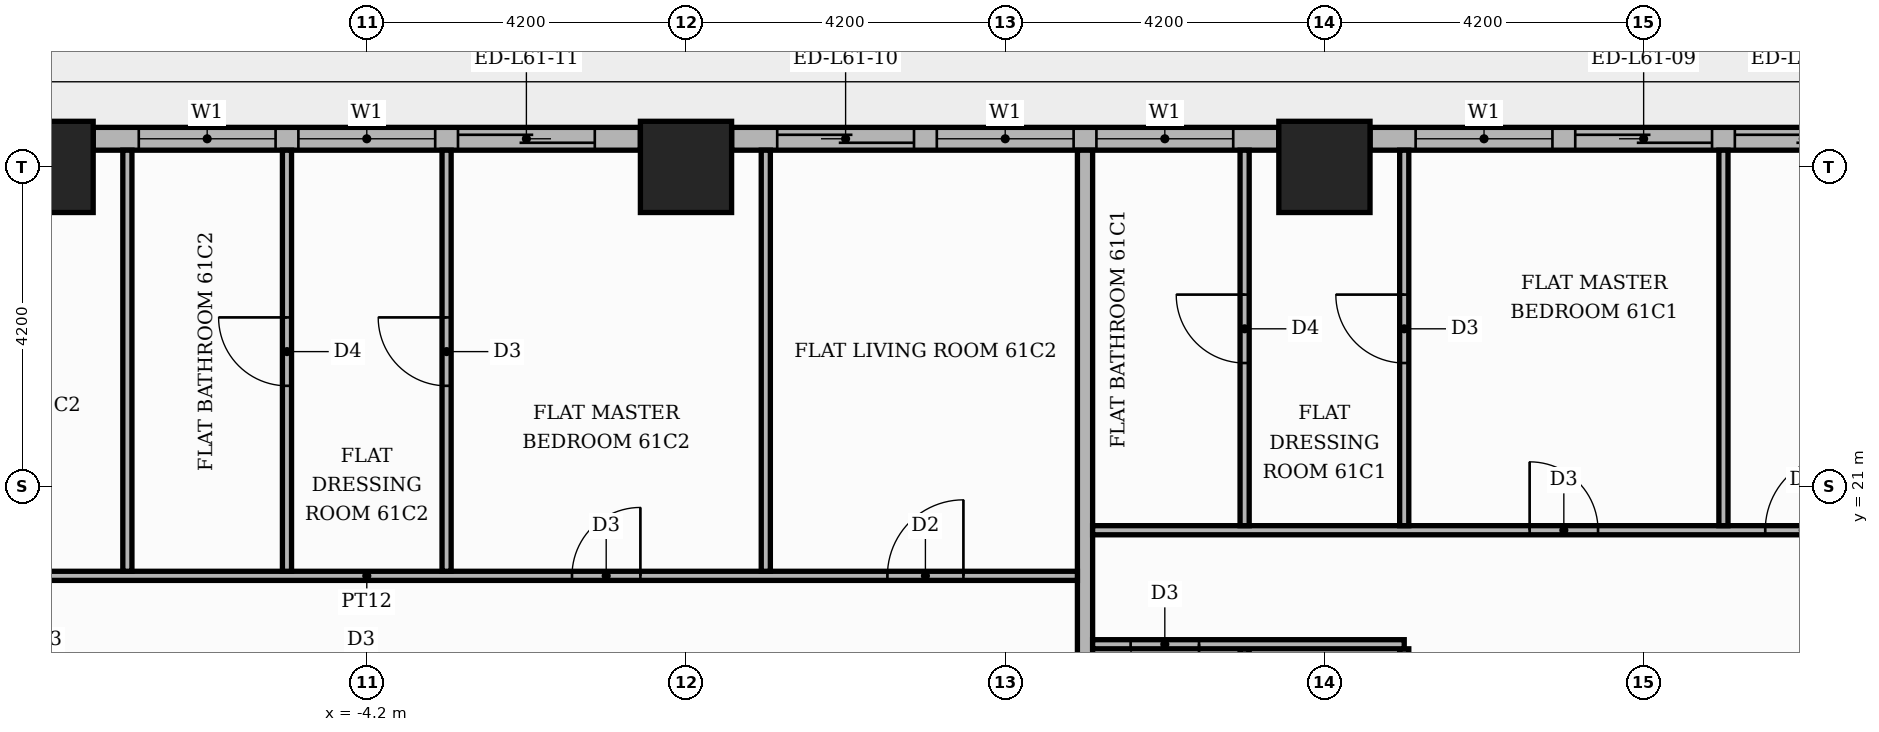
"""IFC4 building model, lengths in metres.
Left out: names, types, materials, properties, quantities, classifications, styles, units other than length and angle.
Written with IfcOpenShell. Run it as: python <this file> out.ifc"""

import sys

from ifc_helpers import new_model, si_unit, direction, frame, frame_2d, origin, origin_2d, place, context, subcontext, project, spatial, rectangle, extrude, element, fill, save


model = new_model("IFC4")
c1 = context("Model", 3, precision=1e-05, world=origin(), true_north=direction((0.0, 1.0)))
c2 = subcontext(c1, "Body", "Model", "MODEL_VIEW")
j1 = project(units=[si_unit("LENGTHUNIT", "METRE"), si_unit("PLANEANGLEUNIT", "RADIAN")], contexts=[c1])
p1 = place(None, origin())
s1 = spatial("IfcSite", under=j1, at=p1, CompositionType="ELEMENT")
p2 = place(p1, origin())
s2 = spatial("IfcBuilding", under=s1, at=p2, CompositionType="ELEMENT")
p3 = place(p2, frame((0.0, 0.0, 256.2)))
s3 = spatial("IfcBuildingStorey", under=s2, at=p3, CompositionType="ELEMENT", Elevation=256.2)
for number, where, z_axis, x_axis in (
    (1, (0.0, 25.2, 0.0), (0.0, 0.0, 1.0), (1.0, 0.0, 0.0)),
    (2, (-8.4, 25.2, 0.0), (0.0, 0.0, 1.0), (1.0, 0.0, 0.0)),
    (3, (8.4, 25.2, 0.0), (0.0, 0.0, 1.0), (1.0, 0.0, 0.0)),
):
    element("IfcColumn", number, at=place(p3, frame(where, z_axis=z_axis, x_axis=x_axis)), inside=s3, PredefinedType="COLUMN", context=c2, shape_type="SweptSolid", body=[
        extrude(rectangle(XDim=1.2, YDim=1.2, at=origin_2d()), origin(), (0.0, 0.0, 1.0), 3.9),
    ])
p4 = place(p3, frame((16.2, 25.57, 0.0), z_axis=(0.0, 0.0, 1.0), x_axis=(-1.0, 0.0, 0.0)))
e4 = element("IfcWall", 4, at=p4, inside=s3, PredefinedType="STANDARD", context=c2, shape_type="SweptSolid", body=[
    extrude(rectangle(XDim=7.2, YDim=0.3, at=frame_2d((3.6, 0.0))), origin(), (0.0, 0.0, 1.0), 3.48),
])
p5 = place(p4, frame((0.6, 0.0, 0.0)))
e5 = element("IfcOpeningElement", 5, at=p5, cuts=e4, PredefinedType="OPENING", context=c2, shape_type="SweptSolid", body=[
    extrude(rectangle(XDim=1.8, YDim=2.4, at=frame_2d((0.9, 1.2))), frame((0.0, 0.16, 0.0), z_axis=(0.0, -1.0, 0.0), x_axis=(1.0, 0.0, 0.0)), (0.0, 0.0, 1.0), 0.32),
])
p6 = place(p4, frame((2.7, 0.0, 0.0)))
e6 = element("IfcOpeningElement", 6, at=p6, cuts=e4, PredefinedType="OPENING", context=c2, shape_type="SweptSolid", body=[
    extrude(rectangle(XDim=1.8, YDim=2.4, at=frame_2d((0.9, 1.2))), frame((0.0, 0.16, 0.0), z_axis=(0.0, -1.0, 0.0), x_axis=(1.0, 0.0, 0.0)), (0.0, 0.0, 1.0), 0.32),
])
p7 = place(p4, frame((4.8, 0.0, 0.9)))
e7 = element("IfcOpeningElement", 7, at=p7, cuts=e4, PredefinedType="OPENING", context=c2, shape_type="SweptSolid", body=[
    extrude(rectangle(XDim=1.8, YDim=2.1, at=frame_2d((0.9, 1.05))), frame((0.0, 0.16, 0.0), z_axis=(0.0, -1.0, 0.0), x_axis=(1.0, 0.0, 0.0)), (0.0, 0.0, 1.0), 0.32),
])
p8 = place(p3, frame((7.8, 25.57, 0.0), z_axis=(0.0, 0.0, 1.0), x_axis=(-1.0, 0.0, 0.0)))
e8 = element("IfcWall", 8, at=p8, inside=s3, PredefinedType="STANDARD", context=c2, shape_type="SweptSolid", body=[
    extrude(rectangle(XDim=7.2, YDim=0.3, at=frame_2d((3.6, 0.0))), origin(), (0.0, 0.0, 1.0), 3.48),
])
p9 = place(p8, frame((0.6, 0.0, 0.9)))
e9 = element("IfcOpeningElement", 9, at=p9, cuts=e8, PredefinedType="OPENING", context=c2, shape_type="SweptSolid", body=[
    extrude(rectangle(XDim=1.8, YDim=2.1, at=frame_2d((0.9, 1.05))), frame((0.0, 0.16, 0.0), z_axis=(0.0, -1.0, 0.0), x_axis=(1.0, 0.0, 0.0)), (0.0, 0.0, 1.0), 0.32),
])
p10 = place(p8, frame((2.7, 0.0, 0.9)))
e10 = element("IfcOpeningElement", 10, at=p10, cuts=e8, PredefinedType="OPENING", context=c2, shape_type="SweptSolid", body=[
    extrude(rectangle(XDim=1.8, YDim=2.1, at=frame_2d((0.9, 1.05))), frame((0.0, 0.16, 0.0), z_axis=(0.0, -1.0, 0.0), x_axis=(1.0, 0.0, 0.0)), (0.0, 0.0, 1.0), 0.32),
])
p11 = place(p8, frame((4.8, 0.0, 0.0)))
e11 = element("IfcOpeningElement", 11, at=p11, cuts=e8, PredefinedType="OPENING", context=c2, shape_type="SweptSolid", body=[
    extrude(rectangle(XDim=1.8, YDim=2.4, at=frame_2d((0.9, 1.2))), frame((0.0, 0.16, 0.0), z_axis=(0.0, -1.0, 0.0), x_axis=(1.0, 0.0, 0.0)), (0.0, 0.0, 1.0), 0.32),
])
p12 = place(p3, frame((-0.6, 25.57, 0.0), z_axis=(0.0, 0.0, 1.0), x_axis=(-1.0, 0.0, 0.0)))
e12 = element("IfcWall", 12, at=p12, inside=s3, PredefinedType="STANDARD", context=c2, shape_type="SweptSolid", body=[
    extrude(rectangle(XDim=7.2, YDim=0.3, at=frame_2d((3.6, 0.0))), origin(), (0.0, 0.0, 1.0), 3.48),
])
p13 = place(p12, frame((0.6, 0.0, 0.0)))
e13 = element("IfcOpeningElement", 13, at=p13, cuts=e12, PredefinedType="OPENING", context=c2, shape_type="SweptSolid", body=[
    extrude(rectangle(XDim=1.8, YDim=2.4, at=frame_2d((0.9, 1.2))), frame((0.0, 0.16, 0.0), z_axis=(0.0, -1.0, 0.0), x_axis=(1.0, 0.0, 0.0)), (0.0, 0.0, 1.0), 0.32),
])
p14 = place(p12, frame((2.7, 0.0, 0.9)))
e14 = element("IfcOpeningElement", 14, at=p14, cuts=e12, PredefinedType="OPENING", context=c2, shape_type="SweptSolid", body=[
    extrude(rectangle(XDim=1.8, YDim=2.1, at=frame_2d((0.9, 1.05))), frame((0.0, 0.16, 0.0), z_axis=(0.0, -1.0, 0.0), x_axis=(1.0, 0.0, 0.0)), (0.0, 0.0, 1.0), 0.32),
])
p15 = place(p12, frame((4.8, 0.0, 0.9)))
e15 = element("IfcOpeningElement", 15, at=p15, cuts=e12, PredefinedType="OPENING", context=c2, shape_type="SweptSolid", body=[
    extrude(rectangle(XDim=1.8, YDim=2.1, at=frame_2d((0.9, 1.05))), frame((0.0, 0.16, 0.0), z_axis=(0.0, -1.0, 0.0), x_axis=(1.0, 0.0, 0.0)), (0.0, 0.0, 1.0), 0.32),
])
p16 = place(p3, frame((5.25, 13.75, 0.0), z_axis=(0.0, 0.0, 1.0), x_axis=(0.0, 1.0, 0.0)))
e16 = element("IfcWall", 16, at=p16, inside=s3, PredefinedType="PARTITIONING", context=c2, shape_type="SweptSolid", body=[
    extrude(rectangle(XDim=11.67, YDim=0.2, at=frame_2d((5.835, 0.0))), origin(), (0.0, 0.0, 1.0), 3.48),
])
p17 = place(p3, frame((7.35, 13.75, 0.0), z_axis=(0.0, 0.0, 1.0), x_axis=(0.0, 1.0, 0.0)))
e17 = element("IfcWall", 17, at=p17, inside=s3, PredefinedType="PARTITIONING", context=c2, shape_type="SweptSolid", body=[
    extrude(rectangle(XDim=5.11, YDim=0.12, at=frame_2d((2.555, 0.0))), origin(), (0.0, 0.0, 1.0), 3.48),
])
p18 = place(p3, frame((9.45, 13.75, 0.0), z_axis=(0.0, 0.0, 1.0), x_axis=(0.0, 1.0, 0.0)))
e18 = element("IfcWall", 18, at=p18, inside=s3, PredefinedType="PARTITIONING", context=c2, shape_type="SweptSolid", body=[
    extrude(rectangle(XDim=5.11, YDim=0.12, at=frame_2d((2.555, 0.0))), origin(), (0.0, 0.0, 1.0), 3.48),
])
p19 = place(p18, frame((2.085, 0.0, 0.0)))
e19 = element("IfcOpeningElement", 19, at=p19, cuts=e18, PredefinedType="OPENING", context=c2, shape_type="SweptSolid", body=[
    extrude(rectangle(XDim=0.9, YDim=2.1, at=frame_2d((0.45, 1.05))), frame((0.0, 0.07, 0.0), z_axis=(0.0, -1.0, 0.0), x_axis=(1.0, 0.0, 0.0)), (0.0, 0.0, 1.0), 0.14),
])
p20 = place(p3, frame((5.35, 18.92, 0.0), z_axis=(0.0, 0.0, 1.0), x_axis=(1.0, 0.0, 0.0)))
e20 = element("IfcWall", 20, at=p20, inside=s3, PredefinedType="PARTITIONING", context=c2, shape_type="SweptSolid", body=[
    extrude(rectangle(XDim=4.1, YDim=0.12, at=frame_2d((2.05, 0.0))), origin(), (0.0, 0.0, 1.0), 3.48),
])
p21 = place(p20, frame((0.5, 0.0, 0.0)))
e21 = element("IfcOpeningElement", 21, at=p21, cuts=e20, PredefinedType="OPENING", context=c2, shape_type="SweptSolid", body=[
    extrude(rectangle(XDim=0.9, YDim=2.1, at=frame_2d((0.45, 1.05))), frame((0.0, 0.07, 0.0), z_axis=(0.0, -1.0, 0.0), x_axis=(1.0, 0.0, 0.0)), (0.0, 0.0, 1.0), 0.14),
])
p22 = place(p3, frame((-13.55, 19.82, 0.0), z_axis=(0.0, 0.0, 1.0), x_axis=(1.0, 0.0, 0.0)))
e22 = element("IfcWall", 22, at=p22, inside=s3, PredefinedType="PARTITIONING", context=c2, shape_type="SweptSolid", body=[
    extrude(rectangle(XDim=18.7, YDim=0.12, at=frame_2d((9.35, 0.0))), origin(), (0.0, 0.0, 1.0), 3.48),
])
p23 = place(p22, frame((16.2, 0.0, 0.0)))
e23 = element("IfcOpeningElement", 23, at=p23, cuts=e22, PredefinedType="OPENING", context=c2, shape_type="SweptSolid", body=[
    extrude(rectangle(XDim=1.0, YDim=2.1, at=frame_2d((0.5, 1.05))), frame((0.0, 0.07, 0.0), z_axis=(0.0, -1.0, 0.0), x_axis=(1.0, 0.0, 0.0)), (0.0, 0.0, 1.0), 0.14),
])
p24 = place(p22, frame((12.05, 0.0, 0.0)))
e24 = element("IfcOpeningElement", 24, at=p24, cuts=e22, PredefinedType="OPENING", context=c2, shape_type="SweptSolid", body=[
    extrude(rectangle(XDim=0.9, YDim=2.1, at=frame_2d((0.45, 1.05))), frame((0.0, 0.07, 0.0), z_axis=(0.0, -1.0, 0.0), x_axis=(1.0, 0.0, 0.0)), (0.0, 0.0, 1.0), 0.14),
])
p25 = place(p22, frame((3.65, 0.0, 0.0)))
e25 = element("IfcOpeningElement", 25, at=p25, cuts=e22, PredefinedType="OPENING", context=c2, shape_type="SweptSolid", body=[
    extrude(rectangle(XDim=0.9, YDim=2.1, at=frame_2d((0.45, 1.05))), frame((0.0, 0.07, 0.0), z_axis=(0.0, -1.0, 0.0), x_axis=(1.0, 0.0, 0.0)), (0.0, 0.0, 1.0), 0.14),
])
p26 = place(p3, frame((-7.35, 19.88, 0.0), z_axis=(0.0, 0.0, 1.0), x_axis=(0.0, 1.0, 0.0)))
e26 = element("IfcWall", 26, at=p26, inside=s3, PredefinedType="PARTITIONING", context=c2, shape_type="SweptSolid", body=[
    extrude(rectangle(XDim=5.54, YDim=0.12, at=frame_2d((2.77, 0.0))), origin(), (0.0, 0.0, 1.0), 3.48),
])
p27 = place(p3, frame((-5.25, 19.88, 0.0), z_axis=(0.0, 0.0, 1.0), x_axis=(0.0, 1.0, 0.0)))
e27 = element("IfcWall", 27, at=p27, inside=s3, PredefinedType="PARTITIONING", context=c2, shape_type="SweptSolid", body=[
    extrude(rectangle(XDim=5.54, YDim=0.12, at=frame_2d((2.77, 0.0))), origin(), (0.0, 0.0, 1.0), 3.48),
])
p28 = place(p27, frame((2.44, 0.0, 0.0)))
e28 = element("IfcOpeningElement", 28, at=p28, cuts=e27, PredefinedType="OPENING", context=c2, shape_type="SweptSolid", body=[
    extrude(rectangle(XDim=0.9, YDim=2.1, at=frame_2d((0.45, 1.05))), frame((0.0, 0.07, 0.0), z_axis=(0.0, -1.0, 0.0), x_axis=(1.0, 0.0, 0.0)), (0.0, 0.0, 1.0), 0.14),
])
p29 = place(p3, frame((-3.15, 19.88, 0.0), z_axis=(0.0, 0.0, 1.0), x_axis=(0.0, 1.0, 0.0)))
e29 = element("IfcWall", 29, at=p29, inside=s3, PredefinedType="PARTITIONING", context=c2, shape_type="SweptSolid", body=[
    extrude(rectangle(XDim=5.54, YDim=0.12, at=frame_2d((2.77, 0.0))), origin(), (0.0, 0.0, 1.0), 3.48),
])
p30 = place(p29, frame((2.44, 0.0, 0.0)))
e30 = element("IfcOpeningElement", 30, at=p30, cuts=e29, PredefinedType="OPENING", context=c2, shape_type="SweptSolid", body=[
    extrude(rectangle(XDim=0.9, YDim=2.1, at=frame_2d((0.45, 1.05))), frame((0.0, 0.07, 0.0), z_axis=(0.0, -1.0, 0.0), x_axis=(1.0, 0.0, 0.0)), (0.0, 0.0, 1.0), 0.14),
])
p31 = place(p3, frame((1.05, 19.88, 0.0), z_axis=(0.0, 0.0, 1.0), x_axis=(0.0, 1.0, 0.0)))
e31 = element("IfcWall", 31, at=p31, inside=s3, PredefinedType="PARTITIONING", context=c2, shape_type="SweptSolid", body=[
    extrude(rectangle(XDim=5.54, YDim=0.12, at=frame_2d((2.77, 0.0))), origin(), (0.0, 0.0, 1.0), 3.48),
])
p32 = place(p3, frame((5.35, 20.42, 0.0), z_axis=(0.0, 0.0, 1.0), x_axis=(1.0, 0.0, 0.0)))
e32 = element("IfcWall", 32, at=p32, inside=s3, PredefinedType="PARTITIONING", context=c2, shape_type="SweptSolid", body=[
    extrude(rectangle(XDim=15.369, YDim=0.12, at=frame_2d((7.685, 0.0))), origin(), (0.0, 0.0, 1.0), 3.48),
])
p33 = place(p32, frame((8.85, 0.0, 0.0)))
e33 = element("IfcOpeningElement", 33, at=p33, cuts=e32, PredefinedType="OPENING", context=c2, shape_type="SweptSolid", body=[
    extrude(rectangle(XDim=1.0, YDim=2.1, at=frame_2d((0.5, 1.05))), frame((0.0, 0.07, 0.0), z_axis=(0.0, -1.0, 0.0), x_axis=(1.0, 0.0, 0.0)), (0.0, 0.0, 1.0), 0.14),
])
p34 = place(p32, frame((5.75, 0.0, 0.0)))
e34 = element("IfcOpeningElement", 34, at=p34, cuts=e32, PredefinedType="OPENING", context=c2, shape_type="SweptSolid", body=[
    extrude(rectangle(XDim=0.9, YDim=2.1, at=frame_2d((0.45, 1.05))), frame((0.0, 0.07, 0.0), z_axis=(0.0, -1.0, 0.0), x_axis=(1.0, 0.0, 0.0)), (0.0, 0.0, 1.0), 0.14),
])
p35 = place(p3, frame((7.35, 20.48, 0.0), z_axis=(0.0, 0.0, 1.0), x_axis=(0.0, 1.0, 0.0)))
e35 = element("IfcWall", 35, at=p35, inside=s3, PredefinedType="PARTITIONING", context=c2, shape_type="SweptSolid", body=[
    extrude(rectangle(XDim=4.94, YDim=0.12, at=frame_2d((2.47, 0.0))), origin(), (0.0, 0.0, 1.0), 3.48),
])
p36 = place(p35, frame((2.14, 0.0, 0.0)))
e36 = element("IfcOpeningElement", 36, at=p36, cuts=e35, PredefinedType="OPENING", context=c2, shape_type="SweptSolid", body=[
    extrude(rectangle(XDim=0.9, YDim=2.1, at=frame_2d((0.45, 1.05))), frame((0.0, 0.07, 0.0), z_axis=(0.0, -1.0, 0.0), x_axis=(1.0, 0.0, 0.0)), (0.0, 0.0, 1.0), 0.14),
])
p37 = place(p3, frame((9.45, 20.48, 0.0), z_axis=(0.0, 0.0, 1.0), x_axis=(0.0, 1.0, 0.0)))
e37 = element("IfcWall", 37, at=p37, inside=s3, PredefinedType="PARTITIONING", context=c2, shape_type="SweptSolid", body=[
    extrude(rectangle(XDim=4.94, YDim=0.12, at=frame_2d((2.47, 0.0))), origin(), (0.0, 0.0, 1.0), 3.48),
])
p38 = place(p37, frame((2.14, 0.0, 0.0)))
e38 = element("IfcOpeningElement", 38, at=p38, cuts=e37, PredefinedType="OPENING", context=c2, shape_type="SweptSolid", body=[
    extrude(rectangle(XDim=0.9, YDim=2.1, at=frame_2d((0.45, 1.05))), frame((0.0, 0.07, 0.0), z_axis=(0.0, -1.0, 0.0), x_axis=(1.0, 0.0, 0.0)), (0.0, 0.0, 1.0), 0.14),
])
p39 = place(p3, frame((13.65, 20.48, 0.0), z_axis=(0.0, 0.0, 1.0), x_axis=(0.0, 1.0, 0.0)))
e39 = element("IfcWall", 39, at=p39, inside=s3, PredefinedType="PARTITIONING", context=c2, shape_type="SweptSolid", body=[
    extrude(rectangle(XDim=4.94, YDim=0.12, at=frame_2d((2.47, 0.0))), origin(), (0.0, 0.0, 1.0), 3.48),
])
p40 = place(p5, origin())
e40 = element("IfcDoor", 40, at=p40, inside=s3, OperationType="SLIDING_TO_LEFT", PredefinedType="DOOR", context=c2, shape_type="SweptSolid", body=[
    extrude(rectangle(XDim=1.8, YDim=2.4, at=frame_2d((0.9, 1.2))), frame((0.0, 0.025, 0.0), z_axis=(0.0, -1.0, 0.0), x_axis=(1.0, 0.0, 0.0)), (0.0, 0.0, 1.0), 0.05),
])
fill(e5, e40)
p41 = place(p6, origin())
e41 = element("IfcDoor", 41, at=p41, inside=s3, OperationType="SLIDING_TO_RIGHT", PredefinedType="DOOR", context=c2, shape_type="SweptSolid", body=[
    extrude(rectangle(XDim=1.8, YDim=2.4, at=frame_2d((0.9, 1.2))), frame((0.0, 0.025, 0.0), z_axis=(0.0, -1.0, 0.0), x_axis=(1.0, 0.0, 0.0)), (0.0, 0.0, 1.0), 0.05),
])
fill(e6, e41)
p42 = place(p7, origin())
e42 = element("IfcWindow", 42, at=p42, inside=s3, PartitioningType="SINGLE_PANEL", PredefinedType="WINDOW", context=c2, shape_type="SweptSolid", body=[
    extrude(rectangle(XDim=1.8, YDim=2.1, at=frame_2d((0.9, 1.05))), frame((0.0, 0.03, 0.0), z_axis=(0.0, -1.0, 0.0), x_axis=(1.0, 0.0, 0.0)), (0.0, 0.0, 1.0), 0.06),
])
fill(e7, e42)
p43 = place(p9, origin())
e43 = element("IfcWindow", 43, at=p43, inside=s3, PartitioningType="SINGLE_PANEL", PredefinedType="WINDOW", context=c2, shape_type="SweptSolid", body=[
    extrude(rectangle(XDim=1.8, YDim=2.1, at=frame_2d((0.9, 1.05))), frame((0.0, 0.03, 0.0), z_axis=(0.0, -1.0, 0.0), x_axis=(1.0, 0.0, 0.0)), (0.0, 0.0, 1.0), 0.06),
])
fill(e9, e43)
p44 = place(p10, origin())
e44 = element("IfcWindow", 44, at=p44, inside=s3, PartitioningType="SINGLE_PANEL", PredefinedType="WINDOW", context=c2, shape_type="SweptSolid", body=[
    extrude(rectangle(XDim=1.8, YDim=2.1, at=frame_2d((0.9, 1.05))), frame((0.0, 0.03, 0.0), z_axis=(0.0, -1.0, 0.0), x_axis=(1.0, 0.0, 0.0)), (0.0, 0.0, 1.0), 0.06),
])
fill(e10, e44)
p45 = place(p11, origin())
e45 = element("IfcDoor", 45, at=p45, inside=s3, OperationType="SLIDING_TO_RIGHT", PredefinedType="DOOR", context=c2, shape_type="SweptSolid", body=[
    extrude(rectangle(XDim=1.8, YDim=2.4, at=frame_2d((0.9, 1.2))), frame((0.0, 0.025, 0.0), z_axis=(0.0, -1.0, 0.0), x_axis=(1.0, 0.0, 0.0)), (0.0, 0.0, 1.0), 0.05),
])
fill(e11, e45)
p46 = place(p13, origin())
e46 = element("IfcDoor", 46, at=p46, inside=s3, OperationType="SLIDING_TO_LEFT", PredefinedType="DOOR", context=c2, shape_type="SweptSolid", body=[
    extrude(rectangle(XDim=1.8, YDim=2.4, at=frame_2d((0.9, 1.2))), frame((0.0, 0.025, 0.0), z_axis=(0.0, -1.0, 0.0), x_axis=(1.0, 0.0, 0.0)), (0.0, 0.0, 1.0), 0.05),
])
fill(e13, e46)
p47 = place(p14, origin())
e47 = element("IfcWindow", 47, at=p47, inside=s3, PartitioningType="SINGLE_PANEL", PredefinedType="WINDOW", context=c2, shape_type="SweptSolid", body=[
    extrude(rectangle(XDim=1.8, YDim=2.1, at=frame_2d((0.9, 1.05))), frame((0.0, 0.03, 0.0), z_axis=(0.0, -1.0, 0.0), x_axis=(1.0, 0.0, 0.0)), (0.0, 0.0, 1.0), 0.06),
])
fill(e14, e47)
p48 = place(p15, origin())
e48 = element("IfcWindow", 48, at=p48, inside=s3, PartitioningType="SINGLE_PANEL", PredefinedType="WINDOW", context=c2, shape_type="SweptSolid", body=[
    extrude(rectangle(XDim=1.8, YDim=2.1, at=frame_2d((0.9, 1.05))), frame((0.0, 0.03, 0.0), z_axis=(0.0, -1.0, 0.0), x_axis=(1.0, 0.0, 0.0)), (0.0, 0.0, 1.0), 0.06),
])
fill(e15, e48)
p49 = place(p21, frame((0.9, 0.0, 0.0), z_axis=(0.0, 0.0, 1.0), x_axis=(-1.0, 0.0, 0.0)))
e49 = element("IfcDoor", 49, at=p49, inside=s3, OperationType="SINGLE_SWING_RIGHT", PredefinedType="DOOR", context=c2, shape_type="SweptSolid", body=[
    extrude(rectangle(XDim=0.9, YDim=2.1, at=frame_2d((0.45, 1.05))), frame((0.0, 0.025, 0.0), z_axis=(0.0, -1.0, 0.0), x_axis=(1.0, 0.0, 0.0)), (0.0, 0.0, 1.0), 0.05),
])
fill(e21, e49)
p50 = place(p33, origin())
e50 = element("IfcDoor", 50, at=p50, inside=s3, OperationType="SINGLE_SWING_RIGHT", PredefinedType="DOOR", context=c2, shape_type="SweptSolid", body=[
    extrude(rectangle(XDim=1.0, YDim=2.1, at=frame_2d((0.5, 1.05))), frame((0.0, 0.025, 0.0), z_axis=(0.0, -1.0, 0.0), x_axis=(1.0, 0.0, 0.0)), (0.0, 0.0, 1.0), 0.05),
])
fill(e33, e50)
p51 = place(p34, origin())
e51 = element("IfcDoor", 51, at=p51, inside=s3, OperationType="SINGLE_SWING_LEFT", PredefinedType="DOOR", context=c2, shape_type="SweptSolid", body=[
    extrude(rectangle(XDim=0.9, YDim=2.1, at=frame_2d((0.45, 1.05))), frame((0.0, 0.025, 0.0), z_axis=(0.0, -1.0, 0.0), x_axis=(1.0, 0.0, 0.0)), (0.0, 0.0, 1.0), 0.05),
])
fill(e34, e51)
p52 = place(p38, origin())
e52 = element("IfcDoor", 52, at=p52, inside=s3, OperationType="SINGLE_SWING_RIGHT", PredefinedType="DOOR", context=c2, shape_type="SweptSolid", body=[
    extrude(rectangle(XDim=0.9, YDim=2.1, at=frame_2d((0.45, 1.05))), frame((0.0, 0.025, 0.0), z_axis=(0.0, -1.0, 0.0), x_axis=(1.0, 0.0, 0.0)), (0.0, 0.0, 1.0), 0.05),
])
fill(e38, e52)
p53 = place(p36, origin())
e53 = element("IfcDoor", 53, at=p53, inside=s3, OperationType="SINGLE_SWING_RIGHT", PredefinedType="DOOR", context=c2, shape_type="SweptSolid", body=[
    extrude(rectangle(XDim=0.9, YDim=2.1, at=frame_2d((0.45, 1.05))), frame((0.0, 0.025, 0.0), z_axis=(0.0, -1.0, 0.0), x_axis=(1.0, 0.0, 0.0)), (0.0, 0.0, 1.0), 0.05),
])
fill(e36, e53)
p54 = place(p23, origin())
e54 = element("IfcDoor", 54, at=p54, inside=s3, OperationType="SINGLE_SWING_RIGHT", PredefinedType="DOOR", context=c2, shape_type="SweptSolid", body=[
    extrude(rectangle(XDim=1.0, YDim=2.1, at=frame_2d((0.5, 1.05))), frame((0.0, 0.025, 0.0), z_axis=(0.0, -1.0, 0.0), x_axis=(1.0, 0.0, 0.0)), (0.0, 0.0, 1.0), 0.05),
])
fill(e23, e54)
p55 = place(p24, origin())
e55 = element("IfcDoor", 55, at=p55, inside=s3, OperationType="SINGLE_SWING_RIGHT", PredefinedType="DOOR", context=c2, shape_type="SweptSolid", body=[
    extrude(rectangle(XDim=0.9, YDim=2.1, at=frame_2d((0.45, 1.05))), frame((0.0, 0.025, 0.0), z_axis=(0.0, -1.0, 0.0), x_axis=(1.0, 0.0, 0.0)), (0.0, 0.0, 1.0), 0.05),
])
fill(e24, e55)
p56 = place(p30, origin())
e56 = element("IfcDoor", 56, at=p56, inside=s3, OperationType="SINGLE_SWING_RIGHT", PredefinedType="DOOR", context=c2, shape_type="SweptSolid", body=[
    extrude(rectangle(XDim=0.9, YDim=2.1, at=frame_2d((0.45, 1.05))), frame((0.0, 0.025, 0.0), z_axis=(0.0, -1.0, 0.0), x_axis=(1.0, 0.0, 0.0)), (0.0, 0.0, 1.0), 0.05),
])
fill(e30, e56)
p57 = place(p28, origin())
e57 = element("IfcDoor", 57, at=p57, inside=s3, OperationType="SINGLE_SWING_RIGHT", PredefinedType="DOOR", context=c2, shape_type="SweptSolid", body=[
    extrude(rectangle(XDim=0.9, YDim=2.1, at=frame_2d((0.45, 1.05))), frame((0.0, 0.025, 0.0), z_axis=(0.0, -1.0, 0.0), x_axis=(1.0, 0.0, 0.0)), (0.0, 0.0, 1.0), 0.05),
])
fill(e28, e57)
save(model, sys.argv[1])
